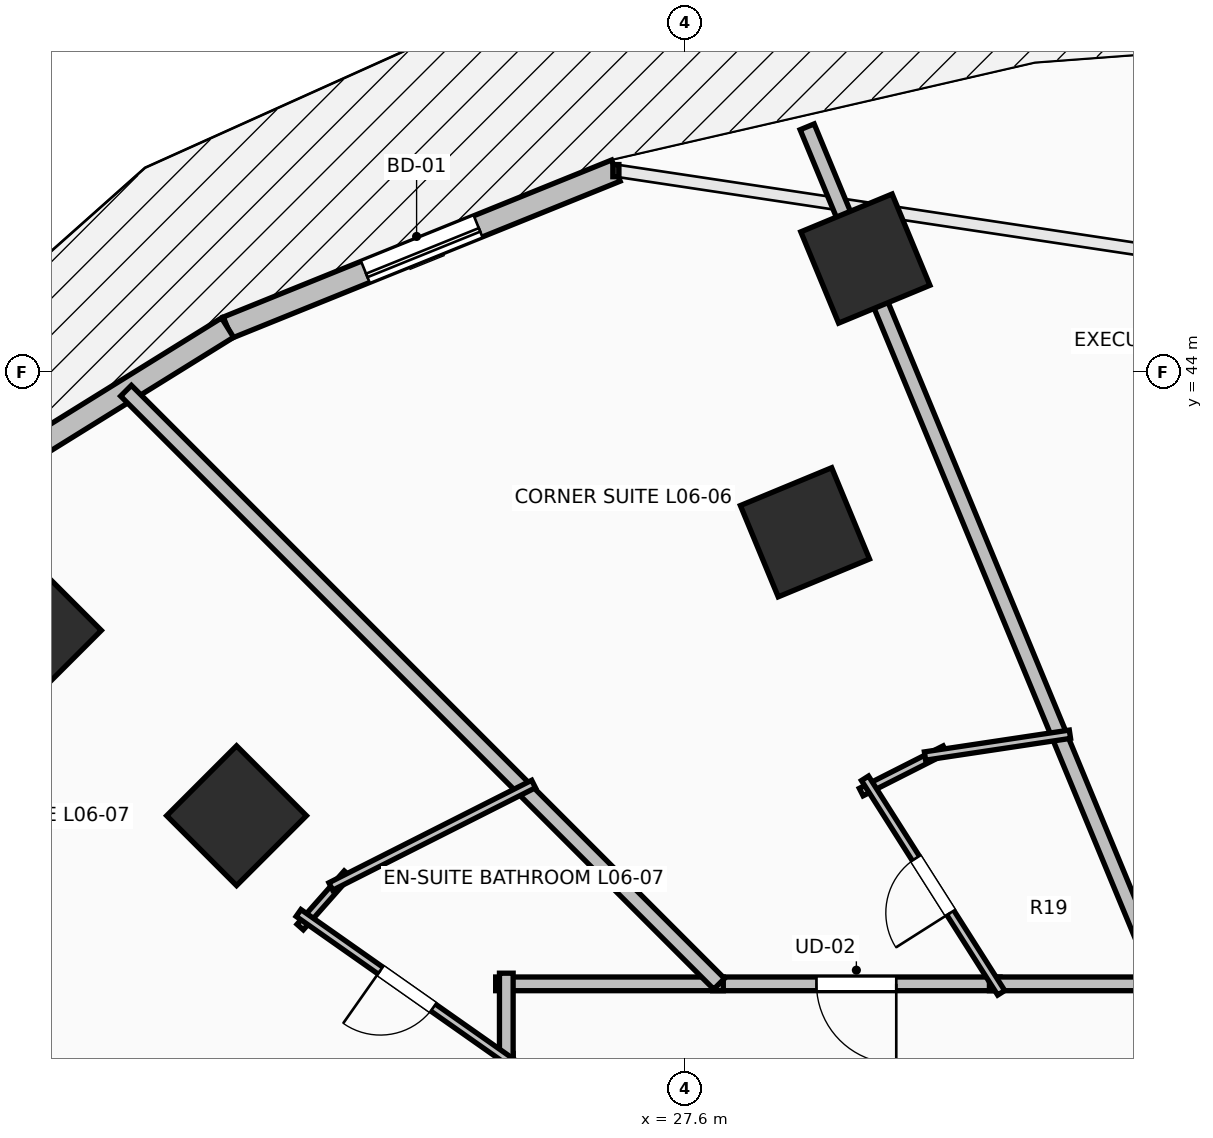
"""IFC4 building model, lengths in metres.
Left out: names, types, materials, properties, quantities, classifications, styles, units other than length and angle.
Written with IfcOpenShell. Run it as: python <this file> out.ifc"""

import sys

from ifc_helpers import new_model, si_unit, direction, frame, frame_2d, origin, origin_2d, place, context, subcontext, project, spatial, rectangle, extrude, element, fill, save


model = new_model("IFC4")
c1 = context("Model", 3, precision=1e-05, world=origin(), true_north=direction((0.0, 1.0)))
c2 = subcontext(c1, "Body", "Model", "MODEL_VIEW")
j1 = project(units=[si_unit("LENGTHUNIT", "METRE"), si_unit("PLANEANGLEUNIT", "RADIAN")], contexts=[c1])
p1 = place(None, origin())
s1 = spatial("IfcSite", under=j1, at=p1, CompositionType="ELEMENT")
p2 = place(p1, origin())
s2 = spatial("IfcBuilding", under=s1, at=p2, CompositionType="ELEMENT")
p3 = place(p2, frame((0.0, 0.0, 27.5)))
s3 = spatial("IfcBuildingStorey", under=s2, at=p3, CompositionType="ELEMENT", Elevation=27.5)
for number, where, z_axis, x_axis in (
    (1, (29.179, 41.891, 0.0), (0.0, 0.0, 1.0), (-0.383, 0.924, 0.0)),
    (2, (21.701, 38.162, 0.0), (0.0, 0.0, 1.0), (-0.707, 0.707, 0.0)),
    (3, (29.974, 45.492, 0.0), (0.0, 0.0, 1.0), (-0.383, 0.924, 0.0)),
    (4, (19.003, 40.6, 0.0), (0.0, 0.0, 1.0), (-0.707, 0.707, 0.0)),
):
    element("IfcColumn", number, at=place(p3, frame(where, z_axis=z_axis, x_axis=x_axis)), inside=s3, PredefinedType="COLUMN", context=c2, shape_type="SweptSolid", body=[
        extrude(rectangle(XDim=1.3, YDim=1.3, at=origin_2d()), origin(), (0.0, 0.0, 1.0), 3.5),
    ])
p4 = place(p3, frame((26.692, 46.649, 0.0), z_axis=(0.0, 0.0, 1.0), x_axis=(-0.927095325176, -0.374825636845, 0.0)))
e5 = element("IfcWall", 5, at=p4, inside=s3, PredefinedType="STANDARD", context=c2, shape_type="SweptSolid", body=[
    extrude(rectangle(XDim=5.51, YDim=0.3, at=frame_2d((2.755, 0.0))), origin(), (0.0, 0.0, 1.0), 3.24),
])
p5 = place(p4, frame((1.955, 0.0, 0.0)))
e6 = element("IfcOpeningElement", 6, at=p5, cuts=e5, PredefinedType="OPENING", context=c2, shape_type="SweptSolid", body=[
    extrude(rectangle(XDim=1.6, YDim=2.3, at=frame_2d((0.8, 1.15))), frame((0.0, 0.165, 0.0), z_axis=(0.0, -1.0, 0.0), x_axis=(1.0, 0.0, 0.0)), (0.0, 0.0, 1.0), 0.33),
])
p6 = place(p3, frame((21.583, 44.583, 0.0), z_axis=(0.0, 0.0, 1.0), x_axis=(-0.849633724826, -0.527373239404, 0.0)))
e7 = element("IfcWall", 7, at=p6, inside=s3, PredefinedType="STANDARD", context=c2, shape_type="SweptSolid", body=[
    extrude(rectangle(XDim=5.271, YDim=0.3, at=frame_2d((2.635, 0.0))), origin(), (0.0, 0.0, 1.0), 3.24),
])
p7 = place(p3, frame((31.746, 35.95, 0.0), z_axis=(0.0, 0.0, 1.0), x_axis=(-1.0, 0.0, 0.0)))
e8 = element("IfcWall", 8, at=p7, inside=s3, PredefinedType="PARTITIONING", context=c2, shape_type="SweptSolid", body=[
    extrude(rectangle(XDim=3.781, YDim=0.18, at=frame_2d((1.891, 0.0))), origin(), (0.0, 0.0, 1.0), 2.432),
])
p8 = place(p7, frame((1.365, 0.0, 0.0)))
e9 = element("IfcOpeningElement", 9, at=p8, cuts=e8, PredefinedType="OPENING", context=c2, shape_type="SweptSolid", body=[
    extrude(rectangle(XDim=1.05, YDim=2.2, at=frame_2d((0.525, 1.1))), frame((0.0, 0.105, 0.0), z_axis=(0.0, -1.0, 0.0), x_axis=(1.0, 0.0, 0.0)), (0.0, 0.0, 1.0), 0.21),
])
p9 = place(p3, frame((33.954, 35.95, 0.0), z_axis=(0.0, 0.0, 1.0), x_axis=(-1.0, 0.0, 0.0)))
e10 = element("IfcWall", 10, at=p9, inside=s3, PredefinedType="PARTITIONING", context=c2, shape_type="SweptSolid", body=[
    extrude(rectangle(XDim=2.348, YDim=0.18, at=frame_2d((1.174, 0.0))), origin(), (0.0, 0.0, 1.0), 3.24),
])
p10 = place(p3, frame((25.25, 35.034, 0.0), z_axis=(0.0, 0.0, 1.0), x_axis=(0.0, -1.0, 0.0)))
e11 = element("IfcWall", 11, at=p10, inside=s3, PredefinedType="PARTITIONING", context=c2, shape_type="SweptSolid", body=[
    extrude(rectangle(XDim=3.813, YDim=0.18, at=frame_2d((1.906, 0.0))), origin(), (0.0, 0.0, 1.0), 2.432),
])
p11 = place(p10, frame((1.382, 0.0, 0.0)))
e12 = element("IfcOpeningElement", 12, at=p11, cuts=e11, PredefinedType="OPENING", context=c2, shape_type="SweptSolid", body=[
    extrude(rectangle(XDim=1.05, YDim=2.2, at=frame_2d((0.525, 1.1))), frame((0.0, 0.105, 0.0), z_axis=(0.0, -1.0, 0.0), x_axis=(1.0, 0.0, 0.0)), (0.0, 0.0, 1.0), 0.21),
])
p12 = place(p3, frame((28.105, 35.95, 0.0), z_axis=(0.0, 0.0, 1.0), x_axis=(-1.0, 0.0, 0.0)))
e13 = element("IfcWall", 13, at=p12, inside=s3, PredefinedType="PARTITIONING", context=c2, shape_type="SweptSolid", body=[
    extrude(rectangle(XDim=2.995, YDim=0.18, at=frame_2d((1.498, 0.0))), origin(), (0.0, 0.0, 1.0), 2.432),
])
p13 = place(p3, frame((25.25, 36.09, 0.0), z_axis=(0.0, 0.0, 1.0), x_axis=(0.0, -1.0, 0.0)))
e14 = element("IfcWall", 14, at=p13, inside=s3, PredefinedType="PARTITIONING", context=c2, shape_type="SweptSolid", body=[
    extrude(rectangle(XDim=1.196, YDim=0.18, at=frame_2d((0.598, 0.0))), origin(), (0.0, 0.0, 1.0), 2.432),
])
p14 = place(p3, frame((29.208, 47.225, 0.0), z_axis=(0.0, 0.0, 1.0), x_axis=(0.382723985517, -0.923862733803, 0.0)))
e15 = element("IfcWall", 15, at=p14, inside=s3, PredefinedType="PARTITIONING", context=c2, shape_type="SweptSolid", body=[
    extrude(rectangle(XDim=12.204, YDim=0.2, at=frame_2d((6.102, 0.0))), origin(), (0.0, 0.0, 1.0), 2.432),
])
p15 = place(p3, frame((29.919, 38.473, 0.0), z_axis=(0.0, 0.0, 1.0), x_axis=(0.892084606746, 0.45186840386, 0.0)))
e16 = element("IfcWall", 16, at=p15, inside=s3, PredefinedType="PARTITIONING", context=c2, shape_type="SweptSolid", body=[
    extrude(rectangle(XDim=1.236, YDim=0.11, at=frame_2d((0.618, 0.0))), origin(), (0.0, 0.0, 1.0), 3.24),
])
p16 = place(p3, frame((30.759, 38.947, 0.0), z_axis=(0.0, 0.0, 1.0), x_axis=(0.988889867338, 0.148650026153, 0.0)))
e17 = element("IfcWall", 17, at=p16, inside=s3, PredefinedType="PARTITIONING", context=c2, shape_type="SweptSolid", body=[
    extrude(rectangle(XDim=1.928, YDim=0.11, at=frame_2d((0.964, 0.0))), origin(), (0.0, 0.0, 1.0), 3.24),
])
p17 = place(p3, frame((31.761, 35.832, 0.0), z_axis=(0.0, 0.0, 1.0), x_axis=(-0.535991614842, 0.844223305067, 0.0)))
e18 = element("IfcWall", 18, at=p17, inside=s3, PredefinedType="PARTITIONING", context=c2, shape_type="SweptSolid", body=[
    extrude(rectangle(XDim=3.343, YDim=0.11, at=frame_2d((1.672, 0.0))), origin(), (0.0, 0.0, 1.0), 2.432),
])
p18 = place(p17, frame((1.247, 0.0, 0.0)))
e19 = element("IfcOpeningElement", 19, at=p18, cuts=e18, PredefinedType="OPENING", context=c2, shape_type="SweptSolid", body=[
    extrude(rectangle(XDim=0.85, YDim=2.1, at=frame_2d((0.425, 1.05))), frame((0.0, 0.07, 0.0), z_axis=(0.0, -1.0, 0.0), x_axis=(1.0, 0.0, 0.0)), (0.0, 0.0, 1.0), 0.14),
])
p19 = place(p3, frame((20.247, 43.753, 0.0), z_axis=(0.0, 0.0, 1.0), x_axis=(0.707106781187, -0.707106781187, 0.0)))
e20 = element("IfcWall", 20, at=p19, inside=s3, PredefinedType="PARTITIONING", context=c2, shape_type="SweptSolid", body=[
    extrude(rectangle(XDim=11.035, YDim=0.2, at=frame_2d((5.518, 0.0))), origin(), (0.0, 0.0, 1.0), 2.432),
])
p20 = place(p3, frame((22.538, 36.697, 0.0), z_axis=(0.0, 0.0, 1.0), x_axis=(0.662242037053, 0.749289986827, 0.0)))
e21 = element("IfcWall", 21, at=p20, inside=s3, PredefinedType="PARTITIONING", context=c2, shape_type="SweptSolid", body=[
    extrude(rectangle(XDim=0.937, YDim=0.11, at=frame_2d((0.468, 0.0))), origin(), (0.0, 0.0, 1.0), 2.432),
])
p21 = place(p3, frame((22.941, 37.231, 0.0), z_axis=(0.0, 0.0, 1.0), x_axis=(0.892507731149, 0.451032094024, 0.0)))
e22 = element("IfcWall", 22, at=p21, inside=s3, PredefinedType="PARTITIONING", context=c2, shape_type="SweptSolid", body=[
    extrude(rectangle(XDim=2.989, YDim=0.11, at=frame_2d((1.495, 0.0))), origin(), (0.0, 0.0, 1.0), 2.432),
])
p22 = place(p3, frame((25.365, 34.881, 0.0), z_axis=(0.0, 0.0, 1.0), x_axis=(-0.81809360258, 0.575085087111, 0.0)))
e23 = element("IfcWall", 23, at=p22, inside=s3, PredefinedType="PARTITIONING", context=c2, shape_type="SweptSolid", body=[
    extrude(rectangle(XDim=3.481, YDim=0.11, at=frame_2d((1.741, 0.0))), origin(), (0.0, 0.0, 1.0), 2.432),
])
p23 = place(p22, frame((1.316, 0.0, 0.0)))
e24 = element("IfcOpeningElement", 24, at=p23, cuts=e23, PredefinedType="OPENING", context=c2, shape_type="SweptSolid", body=[
    extrude(rectangle(XDim=0.85, YDim=2.1, at=frame_2d((0.425, 1.05))), frame((0.0, 0.07, 0.0), z_axis=(0.0, -1.0, 0.0), x_axis=(1.0, 0.0, 0.0)), (0.0, 0.0, 1.0), 0.14),
])
p24 = place(p3, frame((12.207, 36.684, 0.0), z_axis=(0.0, 0.0, 1.0), x_axis=(0.923876032578, -0.382691881842, 0.0)))
e25 = element("IfcWall", 25, at=p24, inside=s3, PredefinedType="PARTITIONING", context=c2, shape_type="SweptSolid", body=[
    extrude(rectangle(XDim=10.63, YDim=0.2, at=frame_2d((5.315, 0.0))), origin(), (0.0, 0.0, 1.0), 2.624),
])
p25 = place(p5, origin())
e26 = element("IfcDoor", 26, at=p25, inside=s3, OperationType="SLIDING_TO_LEFT", PredefinedType="DOOR", context=c2, shape_type="SweptSolid", body=[
    extrude(rectangle(XDim=1.6, YDim=2.3, at=frame_2d((0.8, 1.15))), frame((0.0, 0.025, 0.0), z_axis=(0.0, -1.0, 0.0), x_axis=(1.0, 0.0, 0.0)), (0.0, 0.0, 1.0), 0.05),
])
fill(e6, e26)
p26 = place(p8, origin())
e27 = element("IfcDoor", 27, at=p26, inside=s3, OperationType="SINGLE_SWING_LEFT", PredefinedType="DOOR", context=c2, shape_type="SweptSolid", body=[
    extrude(rectangle(XDim=1.05, YDim=2.2, at=frame_2d((0.525, 1.1))), frame((0.0, 0.025, 0.0), z_axis=(0.0, -1.0, 0.0), x_axis=(1.0, 0.0, 0.0)), (0.0, 0.0, 1.0), 0.05),
])
fill(e9, e27)
p27 = place(p18, origin())
e28 = element("IfcDoor", 28, at=p27, inside=s3, OperationType="SINGLE_SWING_LEFT", PredefinedType="DOOR", context=c2, shape_type="SweptSolid", body=[
    extrude(rectangle(XDim=0.85, YDim=2.1, at=frame_2d((0.425, 1.05))), frame((0.0, 0.025, 0.0), z_axis=(0.0, -1.0, 0.0), x_axis=(1.0, 0.0, 0.0)), (0.0, 0.0, 1.0), 0.05),
])
fill(e19, e28)
p28 = place(p23, origin())
e29 = element("IfcDoor", 29, at=p28, inside=s3, OperationType="SINGLE_SWING_RIGHT", PredefinedType="DOOR", context=c2, shape_type="SweptSolid", body=[
    extrude(rectangle(XDim=0.85, YDim=2.1, at=frame_2d((0.425, 1.05))), frame((0.0, 0.025, 0.0), z_axis=(0.0, -1.0, 0.0), x_axis=(1.0, 0.0, 0.0)), (0.0, 0.0, 1.0), 0.05),
])
fill(e24, e29)
save(model, sys.argv[1])
